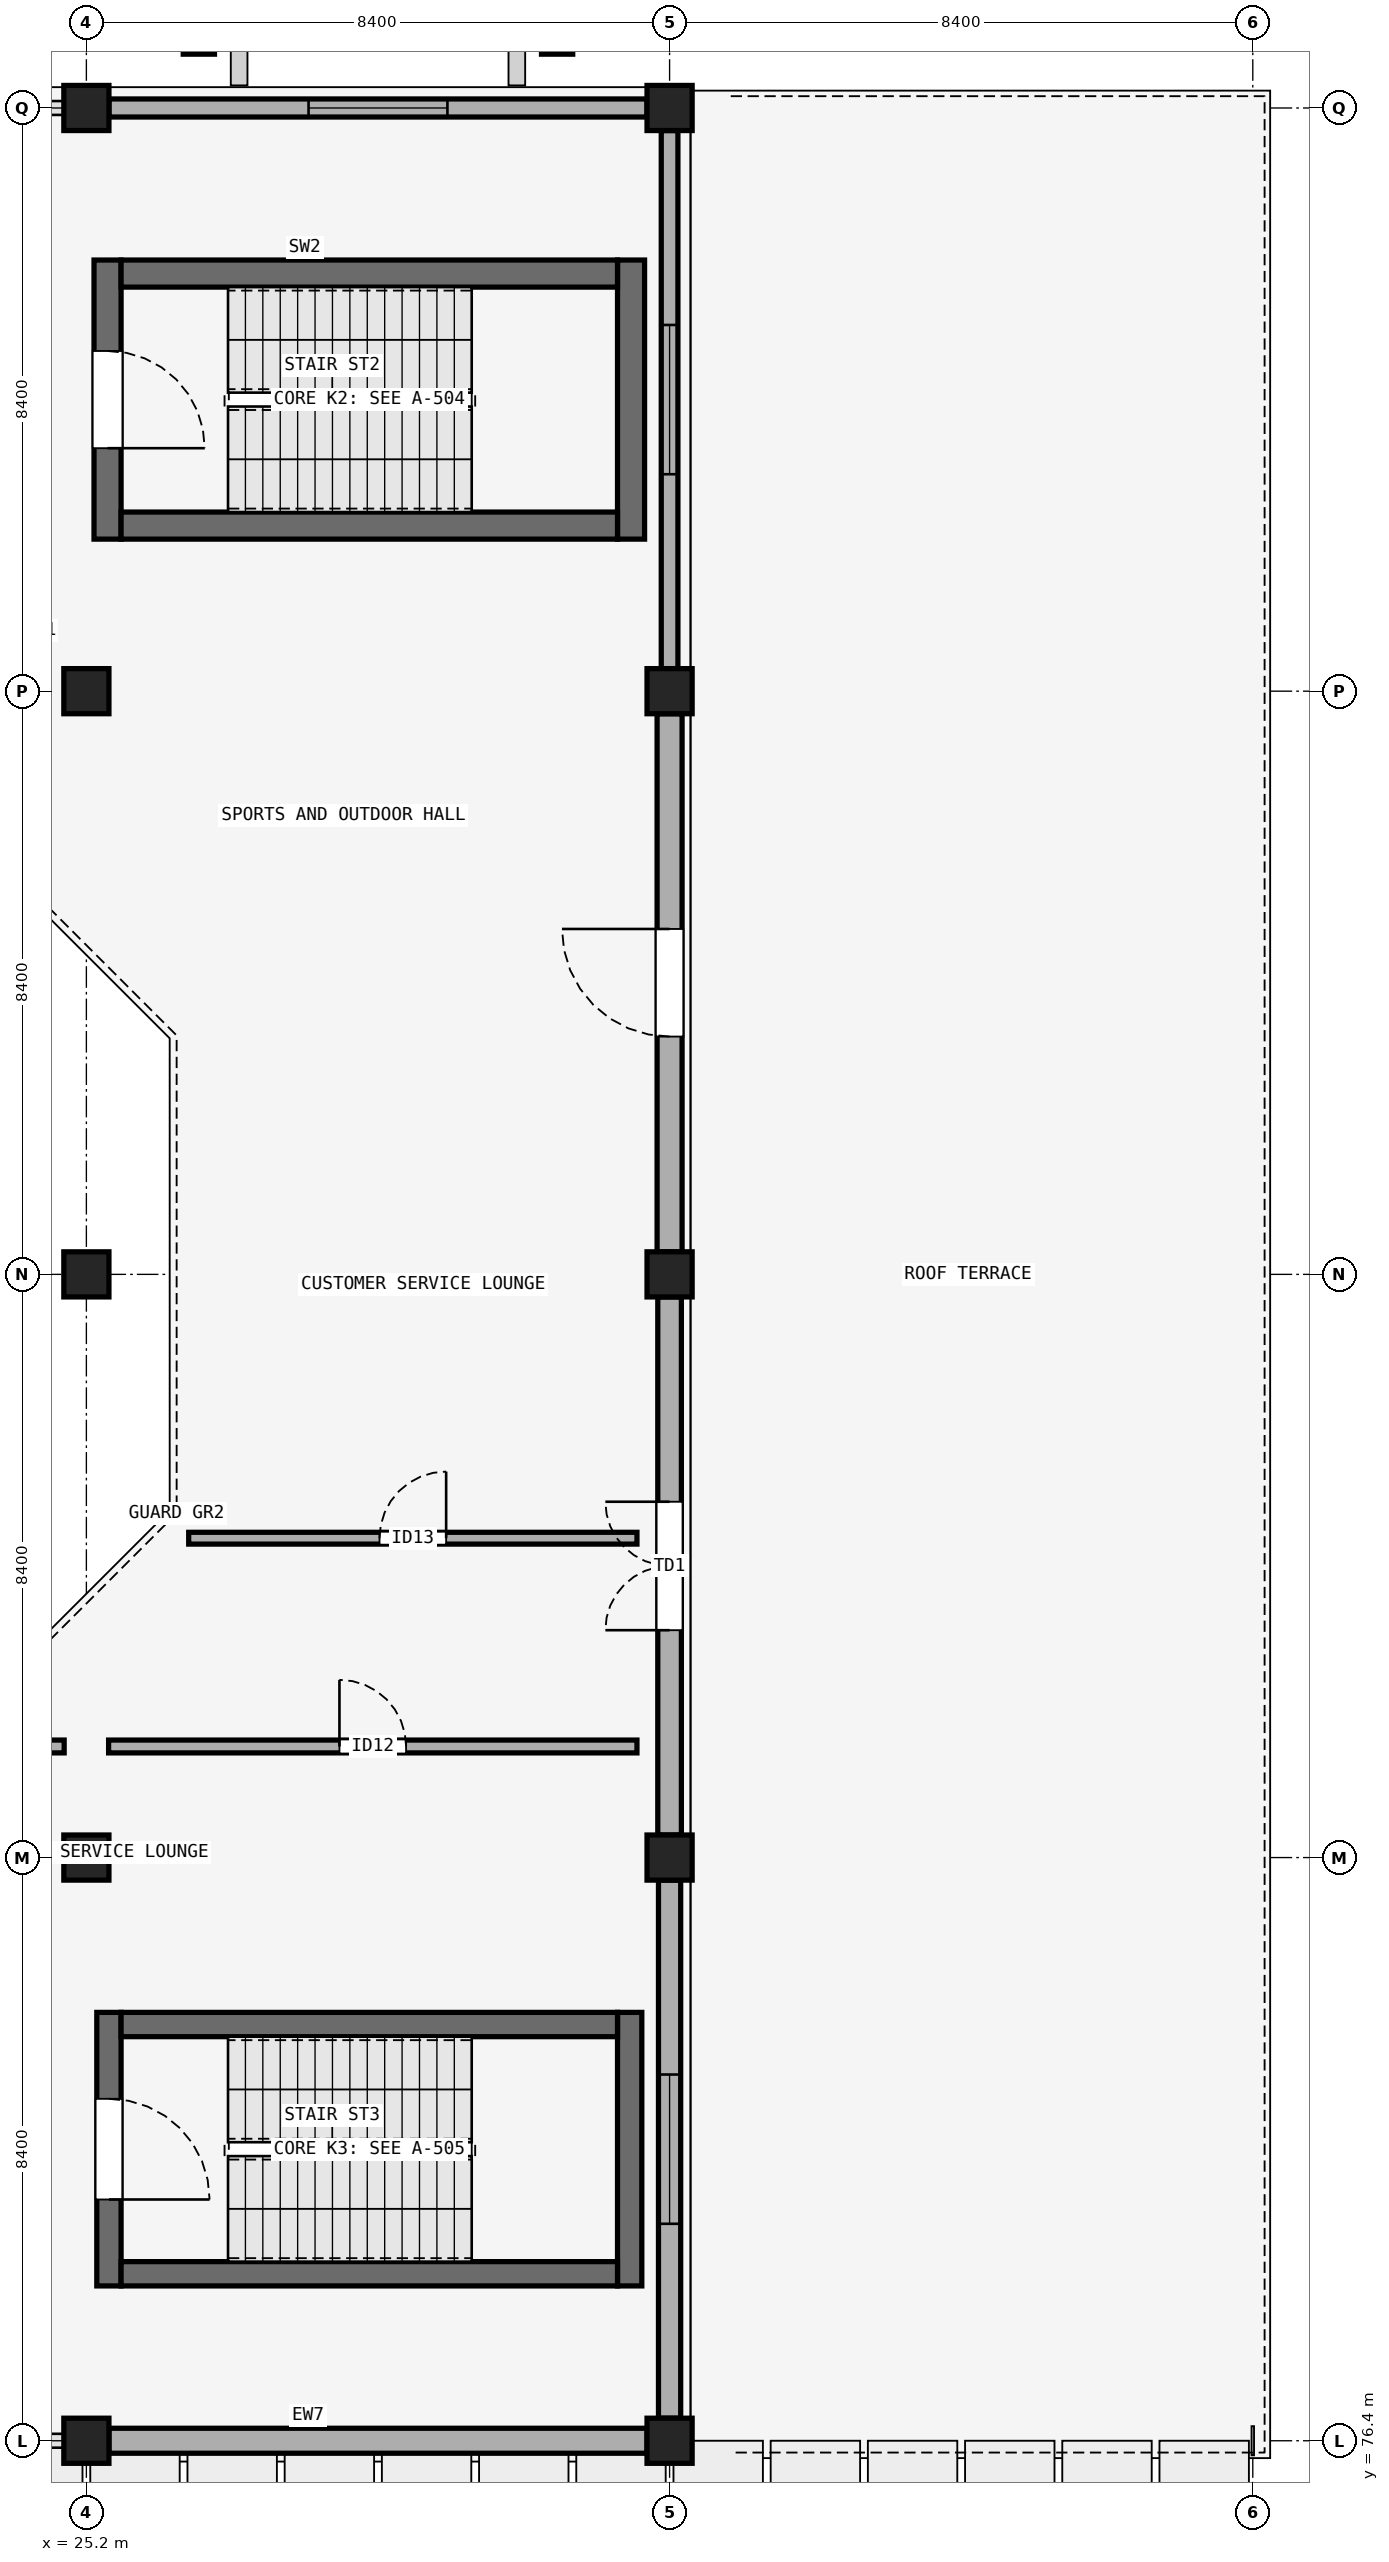
"""IFC4 building model, lengths in metres.
Left out: names, types, materials, properties, quantities, classifications, styles, units other than length and angle.
Written with IfcOpenShell. Run it as: python <this file> out.ifc"""

import sys

from ifc_helpers import new_model, si_unit, direction, frame, frame_2d, origin, origin_2d, place, context, subcontext, project, spatial, rectangle, extrude, element, fill, save


model = new_model("IFC4")
c1 = context("Model", 3, precision=1e-05, world=origin(), true_north=direction((0.0, 1.0)))
c2 = subcontext(c1, "Body", "Model", "MODEL_VIEW")
j1 = project(units=[si_unit("LENGTHUNIT", "METRE"), si_unit("PLANEANGLEUNIT", "RADIAN")], contexts=[c1])
p1 = place(None, origin())
s1 = spatial("IfcSite", under=j1, at=p1, CompositionType="ELEMENT")
p2 = place(p1, origin())
s2 = spatial("IfcBuilding", under=s1, at=p2, CompositionType="ELEMENT")
p3 = place(p2, frame((0.0, 0.0, 27.9)))
s3 = spatial("IfcBuildingStorey", under=s2, at=p3, CompositionType="ELEMENT", Elevation=27.9)
for number, where, z_axis, x_axis in (
    (1, (25.2, 76.4, 0.0), (0.0, 0.0, 1.0), (1.0, 0.0, 0.0)),
    (2, (33.6, 76.4, 0.0), (0.0, 0.0, 1.0), (1.0, 0.0, 0.0)),
    (3, (25.2, 84.8, 0.0), (0.0, 0.0, 1.0), (1.0, 0.0, 0.0)),
    (4, (33.6, 84.8, 0.0), (0.0, 0.0, 1.0), (1.0, 0.0, 0.0)),
    (5, (25.2, 93.2, 0.0), (0.0, 0.0, 1.0), (1.0, 0.0, 0.0)),
    (6, (33.6, 93.2, 0.0), (0.0, 0.0, 1.0), (1.0, 0.0, 0.0)),
    (7, (25.2, 101.6, 0.0), (0.0, 0.0, 1.0), (1.0, 0.0, 0.0)),
    (8, (33.6, 101.6, 0.0), (0.0, 0.0, 1.0), (1.0, 0.0, 0.0)),
    (9, (25.2, 110.0, 0.0), (0.0, 0.0, 1.0), (1.0, 0.0, 0.0)),
    (10, (33.6, 110.0, 0.0), (0.0, 0.0, 1.0), (1.0, 0.0, 0.0)),
):
    element("IfcColumn", number, at=place(p3, frame(where, z_axis=z_axis, x_axis=x_axis)), inside=s3, PredefinedType="COLUMN", context=c2, shape_type="SweptSolid", body=[
        extrude(rectangle(XDim=0.65, YDim=0.65, at=origin_2d()), origin(), (0.0, 0.0, 1.0), 4.5),
    ])
for number, where, z_axis, x_axis in (
    (11, (26.82, 111.05, 0.0), (0.0, 0.0, 1.0), (1.0, 0.0, 0.0)),
    (12, (31.98, 111.05, 0.0), (0.0, 0.0, 1.0), (1.0, 0.0, 0.0)),
):
    element("IfcColumn", number, at=place(p3, frame(where, z_axis=z_axis, x_axis=x_axis)), inside=s3, PredefinedType="PILASTER", context=c2, shape_type="SweptSolid", body=[
        extrude(rectangle(XDim=0.45, YDim=0.55, at=origin_2d()), origin(), (0.0, 0.0, 1.0), 4.5),
    ])
p4 = place(p3, frame((25.525, 76.4, 0.0), z_axis=(0.0, 0.0, 1.0), x_axis=(1.0, 0.0, 0.0)))
e13 = element("IfcWall", 13, at=p4, inside=s3, PredefinedType="SOLIDWALL", context=c2, shape_type="SweptSolid", body=[
    extrude(rectangle(XDim=7.75, YDim=0.36, at=frame_2d((3.875, 0.0))), origin(), (0.0, 0.0, 1.0), 1.74),
])
p5 = place(p3, frame((25.525, 110.0, 0.0), z_axis=(0.0, 0.0, 1.0), x_axis=(1.0, 0.0, 0.0)))
e14 = element("IfcWall", 14, at=p5, inside=s3, PredefinedType="SOLIDWALL", context=c2, shape_type="SweptSolid", body=[
    extrude(rectangle(XDim=7.75, YDim=0.26, at=frame_2d((3.875, 0.0))), origin(), (0.0, 0.0, 1.0), 3.45),
])
p6 = place(p5, frame((2.875, 0.0, 0.95)))
e15 = element("IfcOpeningElement", 15, at=p6, cuts=e14, PredefinedType="OPENING", context=c2, shape_type="SweptSolid", body=[
    extrude(rectangle(XDim=2.0, YDim=2.1, at=frame_2d((1.0, 1.05))), frame((0.0, 0.14, 0.0), z_axis=(0.0, -1.0, 0.0), x_axis=(1.0, 0.0, 0.0)), (0.0, 0.0, 1.0), 0.28),
])
p7 = place(p3, frame((33.6, 76.725, 0.0), z_axis=(0.0, 0.0, 1.0), x_axis=(0.0, 1.0, 0.0)))
e16 = element("IfcWall", 16, at=p7, inside=s3, PredefinedType="SOLIDWALL", context=c2, shape_type="SweptSolid", body=[
    extrude(rectangle(XDim=7.75, YDim=0.32, at=frame_2d((3.875, 0.0))), origin(), (0.0, 0.0, 1.0), 3.45),
])
p8 = place(p7, frame((2.8, 0.0, 0.95)))
e17 = element("IfcOpeningElement", 17, at=p8, cuts=e16, PredefinedType="OPENING", context=c2, shape_type="SweptSolid", body=[
    extrude(rectangle(XDim=2.15, YDim=1.85, at=frame_2d((1.075, 0.925))), frame((0.0, 0.17, 0.0), z_axis=(0.0, -1.0, 0.0), x_axis=(1.0, 0.0, 0.0)), (0.0, 0.0, 1.0), 0.34),
])
p9 = place(p3, frame((33.6, 85.125, 0.0), z_axis=(0.0, 0.0, 1.0), x_axis=(0.0, 1.0, 0.0)))
e18 = element("IfcWall", 18, at=p9, inside=s3, PredefinedType="SOLIDWALL", context=c2, shape_type="SweptSolid", body=[
    extrude(rectangle(XDim=7.75, YDim=0.34, at=frame_2d((3.875, 0.0))), origin(), (0.0, 0.0, 1.0), 3.45),
])
p10 = place(p9, frame((2.95, 0.0, 0.0)))
e19 = element("IfcOpeningElement", 19, at=p10, cuts=e18, PredefinedType="OPENING", context=c2, shape_type="SweptSolid", body=[
    extrude(rectangle(XDim=1.85, YDim=2.3, at=frame_2d((0.925, 1.15))), frame((0.0, 0.18, 0.0), z_axis=(0.0, -1.0, 0.0), x_axis=(1.0, 0.0, 0.0)), (0.0, 0.0, 1.0), 0.36),
])
p11 = place(p3, frame((33.6, 93.525, 0.0), z_axis=(0.0, 0.0, 1.0), x_axis=(0.0, 1.0, 0.0)))
e20 = element("IfcWall", 20, at=p11, inside=s3, PredefinedType="SOLIDWALL", context=c2, shape_type="SweptSolid", body=[
    extrude(rectangle(XDim=7.75, YDim=0.36, at=frame_2d((3.875, 0.0))), origin(), (0.0, 0.0, 1.0), 3.45),
])
p12 = place(p11, frame((3.1, 0.0, 0.0)))
e21 = element("IfcOpeningElement", 21, at=p12, cuts=e20, PredefinedType="OPENING", context=c2, shape_type="SweptSolid", body=[
    extrude(rectangle(XDim=1.55, YDim=2.25, at=frame_2d((0.775, 1.125))), frame((0.0, 0.19, 0.0), z_axis=(0.0, -1.0, 0.0), x_axis=(1.0, 0.0, 0.0)), (0.0, 0.0, 1.0), 0.38),
])
p13 = place(p3, frame((33.6, 101.925, 0.0), z_axis=(0.0, 0.0, 1.0), x_axis=(0.0, 1.0, 0.0)))
e22 = element("IfcWall", 22, at=p13, inside=s3, PredefinedType="SOLIDWALL", context=c2, shape_type="SweptSolid", body=[
    extrude(rectangle(XDim=7.75, YDim=0.24, at=frame_2d((3.875, 0.0))), origin(), (0.0, 0.0, 1.0), 3.45),
])
p14 = place(p13, frame((2.8, 0.0, 0.95)))
e23 = element("IfcOpeningElement", 23, at=p14, cuts=e22, PredefinedType="OPENING", context=c2, shape_type="SweptSolid", body=[
    extrude(rectangle(XDim=2.15, YDim=2.1, at=frame_2d((1.075, 1.05))), frame((0.0, 0.13, 0.0), z_axis=(0.0, -1.0, 0.0), x_axis=(1.0, 0.0, 0.0)), (0.0, 0.0, 1.0), 0.26),
])
p15 = place(p3, frame((25.505, 107.81, 0.0), z_axis=(0.0, 0.0, 1.0), x_axis=(0.0, -1.0, 0.0)))
e24 = element("IfcWall", 24, at=p15, inside=s3, PredefinedType="SHEAR", context=c2, shape_type="SweptSolid", body=[
    extrude(rectangle(XDim=4.02, YDim=0.39, at=frame_2d((2.01, 0.0))), origin(), (0.0, 0.0, 1.0), 4.2),
])
p16 = place(p15, frame((1.31, 0.0, 0.0)))
e25 = element("IfcOpeningElement", 25, at=p16, cuts=e24, PredefinedType="OPENING", context=c2, shape_type="SweptSolid", body=[
    extrude(rectangle(XDim=1.4, YDim=2.15, at=frame_2d((0.7, 1.075))), frame((0.0, 0.205, 0.0), z_axis=(0.0, -1.0, 0.0), x_axis=(1.0, 0.0, 0.0)), (0.0, 0.0, 1.0), 0.41),
])
p17 = place(p3, frame((33.045, 103.79, 0.0), z_axis=(0.0, 0.0, 1.0), x_axis=(0.0, 1.0, 0.0)))
e26 = element("IfcWall", 26, at=p17, inside=s3, PredefinedType="SHEAR", context=c2, shape_type="SweptSolid", body=[
    extrude(rectangle(XDim=4.02, YDim=0.39, at=frame_2d((2.01, 0.0))), origin(), (0.0, 0.0, 1.0), 4.2),
])
for number, where, z_axis, x_axis in (
    (27, (25.7, 103.985, 0.0), (0.0, 0.0, 1.0), (1.0, 0.0, 0.0)),
    (28, (25.7, 107.615, 0.0), (0.0, 0.0, 1.0), (1.0, 0.0, 0.0)),
):
    element("IfcWall", number, at=place(p3, frame(where, z_axis=z_axis, x_axis=x_axis)), inside=s3, PredefinedType="SHEAR", context=c2, shape_type="SweptSolid", body=[
        extrude(rectangle(XDim=7.15, YDim=0.39, at=frame_2d((3.575, 0.0))), origin(), (0.0, 0.0, 1.0), 4.2),
    ])
p18 = place(p3, frame((25.525, 82.57, 0.0), z_axis=(0.0, 0.0, 1.0), x_axis=(0.0, -1.0, 0.0)))
e29 = element("IfcWall", 29, at=p18, inside=s3, PredefinedType="SHEAR", context=c2, shape_type="SweptSolid", body=[
    extrude(rectangle(XDim=3.94, YDim=0.35, at=frame_2d((1.97, 0.0))), origin(), (0.0, 0.0, 1.0), 4.2),
])
p19 = place(p18, frame((1.245, 0.0, 0.0)))
e30 = element("IfcOpeningElement", 30, at=p19, cuts=e29, PredefinedType="OPENING", context=c2, shape_type="SweptSolid", body=[
    extrude(rectangle(XDim=1.45, YDim=2.2, at=frame_2d((0.725, 1.1))), frame((0.0, 0.185, 0.0), z_axis=(0.0, -1.0, 0.0), x_axis=(1.0, 0.0, 0.0)), (0.0, 0.0, 1.0), 0.37),
])
p20 = place(p3, frame((33.025, 78.63, 0.0), z_axis=(0.0, 0.0, 1.0), x_axis=(0.0, 1.0, 0.0)))
e31 = element("IfcWall", 31, at=p20, inside=s3, PredefinedType="SHEAR", context=c2, shape_type="SweptSolid", body=[
    extrude(rectangle(XDim=3.94, YDim=0.35, at=frame_2d((1.97, 0.0))), origin(), (0.0, 0.0, 1.0), 4.2),
])
for number, where, z_axis, x_axis in (
    (32, (25.7, 78.805, 0.0), (0.0, 0.0, 1.0), (1.0, 0.0, 0.0)),
    (33, (25.7, 82.395, 0.0), (0.0, 0.0, 1.0), (1.0, 0.0, 0.0)),
):
    element("IfcWall", number, at=place(p3, frame(where, z_axis=z_axis, x_axis=x_axis)), inside=s3, PredefinedType="SHEAR", context=c2, shape_type="SweptSolid", body=[
        extrude(rectangle(XDim=7.15, YDim=0.35, at=frame_2d((3.575, 0.0))), origin(), (0.0, 0.0, 1.0), 4.2),
    ])
p21 = place(p3, frame((17.27, 86.4, 0.0), z_axis=(0.0, 0.0, 1.0), x_axis=(1.0, 0.0, 0.0)))
e34 = element("IfcWall", 34, at=p21, inside=s3, PredefinedType="PARTITIONING", context=c2, shape_type="SweptSolid", body=[
    extrude(rectangle(XDim=7.61, YDim=0.185, at=frame_2d((3.805, 0.0))), origin(), (0.0, 0.0, 1.0), 4.2),
])
p22 = place(p3, frame((25.52, 86.4, 0.0), z_axis=(0.0, 0.0, 1.0), x_axis=(1.0, 0.0, 0.0)))
e35 = element("IfcWall", 35, at=p22, inside=s3, PredefinedType="PARTITIONING", context=c2, shape_type="SweptSolid", body=[
    extrude(rectangle(XDim=7.61, YDim=0.185, at=frame_2d((3.805, 0.0))), origin(), (0.0, 0.0, 1.0), 4.2),
])
p23 = place(p22, frame((3.325, 0.0, 0.0)))
e36 = element("IfcOpeningElement", 36, at=p23, cuts=e35, PredefinedType="OPENING", context=c2, shape_type="SweptSolid", body=[
    extrude(rectangle(XDim=0.96, YDim=2.22, at=frame_2d((0.48, 1.11))), frame((0.0, 0.103, 0.0), z_axis=(0.0, -1.0, 0.0), x_axis=(1.0, 0.0, 0.0)), (0.0, 0.0, 1.0), 0.205),
])
p24 = place(p3, frame((26.674, 89.4, 0.0), z_axis=(0.0, 0.0, 1.0), x_axis=(1.0, 0.0, 0.0)))
e37 = element("IfcWall", 37, at=p24, inside=s3, PredefinedType="PARTITIONING", context=c2, shape_type="SweptSolid", body=[
    extrude(rectangle(XDim=6.456, YDim=0.17, at=frame_2d((3.228, 0.0))), origin(), (0.0, 0.0, 1.0), 4.2),
])
p25 = place(p24, frame((2.748, 0.0, 0.0)))
e38 = element("IfcOpeningElement", 38, at=p25, cuts=e37, PredefinedType="OPENING", context=c2, shape_type="SweptSolid", body=[
    extrude(rectangle(XDim=0.96, YDim=2.34, at=frame_2d((0.48, 1.17))), frame((0.0, 0.095, 0.0), z_axis=(0.0, -1.0, 0.0), x_axis=(1.0, 0.0, 0.0)), (0.0, 0.0, 1.0), 0.19),
])
p26 = place(p6, origin())
e39 = element("IfcWindow", 39, at=p26, inside=s3, PartitioningType="DOUBLE_PANEL_VERTICAL", PredefinedType="WINDOW", context=c2, shape_type="SweptSolid", body=[
    extrude(rectangle(XDim=2.0, YDim=2.1, at=frame_2d((1.0, 1.05))), frame((0.0, 0.03, 0.0), z_axis=(0.0, -1.0, 0.0), x_axis=(1.0, 0.0, 0.0)), (0.0, 0.0, 1.0), 0.06),
])
fill(e15, e39)
p27 = place(p8, origin())
e40 = element("IfcWindow", 40, at=p27, inside=s3, PartitioningType="DOUBLE_PANEL_VERTICAL", PredefinedType="WINDOW", context=c2, shape_type="SweptSolid", body=[
    extrude(rectangle(XDim=2.15, YDim=1.85, at=frame_2d((1.075, 0.925))), frame((0.0, 0.03, 0.0), z_axis=(0.0, -1.0, 0.0), x_axis=(1.0, 0.0, 0.0)), (0.0, 0.0, 1.0), 0.06),
])
fill(e17, e40)
p28 = place(p10, origin())
e41 = element("IfcDoor", 41, at=p28, inside=s3, OperationType="DOUBLE_DOOR_SINGLE_SWING", PredefinedType="DOOR", context=c2, shape_type="SweptSolid", body=[
    extrude(rectangle(XDim=1.85, YDim=2.3, at=frame_2d((0.925, 1.15))), frame((0.0, 0.025, 0.0), z_axis=(0.0, -1.0, 0.0), x_axis=(1.0, 0.0, 0.0)), (0.0, 0.0, 1.0), 0.05),
])
fill(e19, e41)
p29 = place(p12, origin())
e42 = element("IfcDoor", 42, at=p29, inside=s3, OperationType="SINGLE_SWING_RIGHT", PredefinedType="DOOR", context=c2, shape_type="SweptSolid", body=[
    extrude(rectangle(XDim=1.55, YDim=2.25, at=frame_2d((0.775, 1.125))), frame((0.0, 0.025, 0.0), z_axis=(0.0, -1.0, 0.0), x_axis=(1.0, 0.0, 0.0)), (0.0, 0.0, 1.0), 0.05),
])
fill(e21, e42)
p30 = place(p14, origin())
e43 = element("IfcWindow", 43, at=p30, inside=s3, PartitioningType="DOUBLE_PANEL_VERTICAL", PredefinedType="WINDOW", context=c2, shape_type="SweptSolid", body=[
    extrude(rectangle(XDim=2.15, YDim=2.1, at=frame_2d((1.075, 1.05))), frame((0.0, 0.03, 0.0), z_axis=(0.0, -1.0, 0.0), x_axis=(1.0, 0.0, 0.0)), (0.0, 0.0, 1.0), 0.06),
])
fill(e23, e43)
p31 = place(p16, origin())
e44 = element("IfcDoor", 44, at=p31, inside=s3, OperationType="SINGLE_SWING_RIGHT", PredefinedType="DOOR", context=c2, shape_type="SweptSolid", body=[
    extrude(rectangle(XDim=1.4, YDim=2.15, at=frame_2d((0.7, 1.075))), frame((0.0, 0.025, 0.0), z_axis=(0.0, -1.0, 0.0), x_axis=(1.0, 0.0, 0.0)), (0.0, 0.0, 1.0), 0.05),
])
fill(e25, e44)
p32 = place(p19, origin())
e45 = element("IfcDoor", 45, at=p32, inside=s3, OperationType="SINGLE_SWING_RIGHT", PredefinedType="DOOR", context=c2, shape_type="SweptSolid", body=[
    extrude(rectangle(XDim=1.45, YDim=2.2, at=frame_2d((0.725, 1.1))), frame((0.0, 0.025, 0.0), z_axis=(0.0, -1.0, 0.0), x_axis=(1.0, 0.0, 0.0)), (0.0, 0.0, 1.0), 0.05),
])
fill(e30, e45)
p33 = place(p23, origin())
e46 = element("IfcDoor", 46, at=p33, inside=s3, OperationType="SINGLE_SWING_LEFT", PredefinedType="DOOR", context=c2, shape_type="SweptSolid", body=[
    extrude(rectangle(XDim=0.96, YDim=2.22, at=frame_2d((0.48, 1.11))), frame((0.0, 0.025, 0.0), z_axis=(0.0, -1.0, 0.0), x_axis=(1.0, 0.0, 0.0)), (0.0, 0.0, 1.0), 0.05),
])
fill(e36, e46)
p34 = place(p25, origin())
e47 = element("IfcDoor", 47, at=p34, inside=s3, OperationType="SINGLE_SWING_RIGHT", PredefinedType="DOOR", context=c2, shape_type="SweptSolid", body=[
    extrude(rectangle(XDim=0.96, YDim=2.34, at=frame_2d((0.48, 1.17))), frame((0.0, 0.025, 0.0), z_axis=(0.0, -1.0, 0.0), x_axis=(1.0, 0.0, 0.0)), (0.0, 0.0, 1.0), 0.05),
])
fill(e38, e47)
save(model, sys.argv[1])
